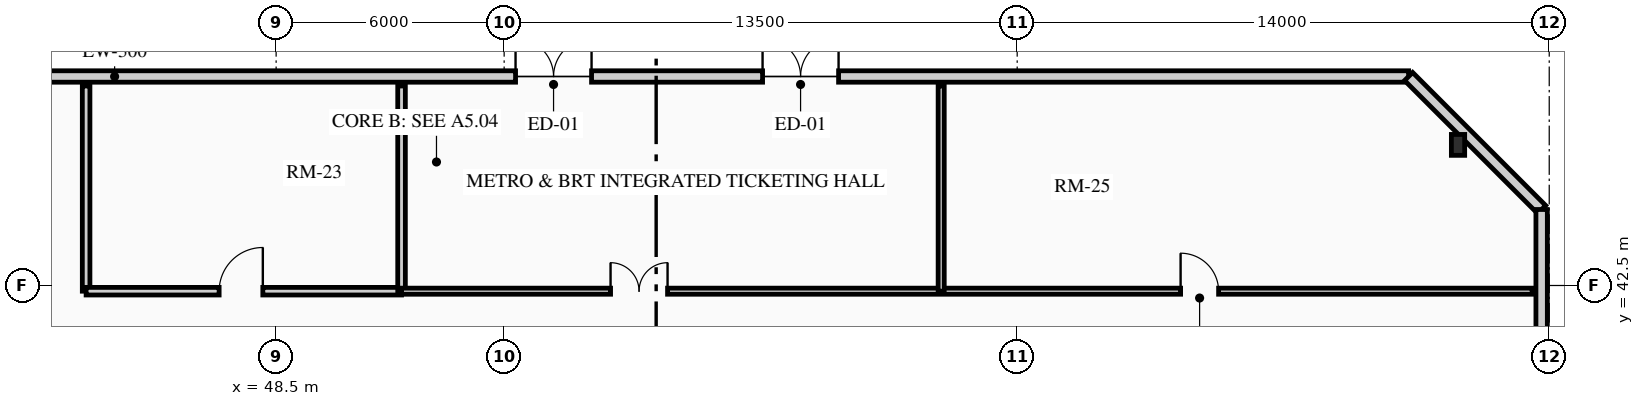
"""IFC4 building model, lengths in metres.
Left out: names, types, materials, properties, quantities, classifications, styles, units other than length and angle.
Written with IfcOpenShell. Run it as: python <this file> out.ifc"""

import sys

from ifc_helpers import new_model, si_unit, direction, frame, frame_2d, origin, origin_2d, place, context, subcontext, project, spatial, rectangle, hollow_rectangle, extrude, source, transform, mapped, element, fill, save


model = new_model("IFC4")
c1 = context("Model", 3, precision=1e-05, world=origin(), true_north=direction((0.0, 1.0)))
c2 = subcontext(c1, "Body", "Model", "MODEL_VIEW")
j1 = project(units=[si_unit("LENGTHUNIT", "METRE"), si_unit("PLANEANGLEUNIT", "RADIAN")], contexts=[c1])
p1 = place(None, origin())
s1 = spatial("IfcSite", under=j1, at=p1, CompositionType="ELEMENT")
p2 = place(p1, origin())
s2 = spatial("IfcBuilding", under=s1, at=p2, CompositionType="ELEMENT")
p3 = place(p2, origin())
s3 = spatial("IfcBuildingStorey", under=s2, at=p3, CompositionType="ELEMENT", Elevation=0.0)
p4 = place(p3, frame((79.6, 46.2, 0.0), z_axis=(0.0, 0.0, 1.0), x_axis=(1.0, 0.0, 0.0)))
e1 = element("IfcColumn", 1, at=p4, inside=s3, PredefinedType="PILASTER", context=c2, shape_type="SweptSolid", body=[
    extrude(hollow_rectangle(XDim=0.35, YDim=0.55, WallThickness=0.022, at=origin_2d()), origin(), (0.0, 0.0, 1.0), 4.8),
])
p5 = place(p3, frame((3.8, 48.0, 0.0), z_axis=(0.0, 0.0, 1.0), x_axis=(1.0, 0.0, 0.0)))
e2 = element("IfcWall", 2, at=p5, inside=s3, PredefinedType="SOLIDWALL", context=c2, shape_type="SweptSolid", body=[
    extrude(rectangle(XDim=74.5, YDim=0.3, at=frame_2d((37.25, 0.0))), origin(), (0.0, 0.0, 1.0), 4.485),
])
m1 = source(origin(), c2, "Body", "SweptSolid", [
    extrude(rectangle(XDim=1.4, YDim=2.15, at=frame_2d((0.7, 1.075))), frame((0.0, 0.16, 0.0), z_axis=(0.0, -1.0, 0.0), x_axis=(1.0, 0.0, 0.0)), (0.0, 0.0, 1.0), 0.32),
])
p6 = place(p5, frame((8.2, 0.0, 0.0)))
e3 = element("IfcOpeningElement", 3, at=p6, cuts=e2, PredefinedType="OPENING", context=c2, shape_type="MappedRepresentation", body=[
    mapped(m1, transform((0.0, 0.0, 0.0), x_axis=(1.0, 0.0, 0.0), y_axis=(0.0, 1.0, 0.0), z_axis=(0.0, 0.0, 1.0), scale=1.0)),
])
m2 = source(origin(), c2, "Body", "SweptSolid", [
    extrude(rectangle(XDim=2.0, YDim=2.25, at=frame_2d((1.0, 1.125))), frame((0.0, 0.16, 0.0), z_axis=(0.0, -1.0, 0.0), x_axis=(1.0, 0.0, 0.0)), (0.0, 0.0, 1.0), 0.32),
])
p7 = place(p5, frame((13.0, 0.0, 0.0)))
e4 = element("IfcOpeningElement", 4, at=p7, cuts=e2, PredefinedType="OPENING", context=c2, shape_type="MappedRepresentation", body=[
    mapped(m2, transform((0.0, 0.0, 0.0), x_axis=(1.0, 0.0, 0.0), y_axis=(0.0, 1.0, 0.0), z_axis=(0.0, 0.0, 1.0), scale=1.0)),
])
p8 = place(p5, frame((23.6, 0.0, 0.0)))
e5 = element("IfcOpeningElement", 5, at=p8, cuts=e2, PredefinedType="OPENING", context=c2, shape_type="MappedRepresentation", body=[
    mapped(m1, transform((0.0, 0.0, 0.0), x_axis=(1.0, 0.0, 0.0), y_axis=(0.0, 1.0, 0.0), z_axis=(0.0, 0.0, 1.0), scale=1.0)),
])
p9 = place(p5, frame((27.9, 0.0, 0.0)))
e6 = element("IfcOpeningElement", 6, at=p9, cuts=e2, PredefinedType="OPENING", context=c2, shape_type="MappedRepresentation", body=[
    mapped(m2, transform((0.0, 0.0, 0.0), x_axis=(1.0, 0.0, 0.0), y_axis=(0.0, 1.0, 0.0), z_axis=(0.0, 0.0, 1.0), scale=1.0)),
])
p10 = place(p5, frame((51.0, 0.0, 0.0)))
e7 = element("IfcOpeningElement", 7, at=p10, cuts=e2, PredefinedType="OPENING", context=c2, shape_type="MappedRepresentation", body=[
    mapped(m2, transform((0.0, 0.0, 0.0), x_axis=(1.0, 0.0, 0.0), y_axis=(0.0, 1.0, 0.0), z_axis=(0.0, 0.0, 1.0), scale=1.0)),
])
p11 = place(p5, frame((57.5, 0.0, 0.0)))
e8 = element("IfcOpeningElement", 8, at=p11, cuts=e2, PredefinedType="OPENING", context=c2, shape_type="MappedRepresentation", body=[
    mapped(m2, transform((0.0, 0.0, 0.0), x_axis=(1.0, 0.0, 0.0), y_axis=(0.0, 1.0, 0.0), z_axis=(0.0, 0.0, 1.0), scale=1.0)),
])
p12 = place(p3, frame((78.3, 48.0, 0.0), z_axis=(0.0, 0.0, 1.0), x_axis=(0.707106781187, -0.707106781187, 0.0)))
e9 = element("IfcWall", 9, at=p12, inside=s3, PredefinedType="SOLIDWALL", context=c2, shape_type="SweptSolid", body=[
    extrude(rectangle(XDim=4.95, YDim=0.3, at=frame_2d((2.475, 0.0))), origin(), (0.0, 0.0, 1.0), 4.485),
])
p13 = place(p3, frame((81.8, 44.5, 0.0), z_axis=(0.0, 0.0, 1.0), x_axis=(0.0, -1.0, 0.0)))
e10 = element("IfcWall", 10, at=p13, inside=s3, PredefinedType="SOLIDWALL", context=c2, shape_type="SweptSolid", body=[
    extrude(rectangle(XDim=40.0, YDim=0.3, at=frame_2d((20.0, 0.0))), origin(), (0.0, 0.0, 1.0), 4.485),
])
m3 = source(origin(), c2, "Body", "SweptSolid", [
    extrude(rectangle(XDim=6.0, YDim=3.1, at=frame_2d((3.0, 1.55))), frame((0.0, 0.16, 0.0), z_axis=(0.0, -1.0, 0.0), x_axis=(1.0, 0.0, 0.0)), (0.0, 0.0, 1.0), 0.32),
])
p14 = place(p13, frame((33.6, 0.0, 0.0)))
e11 = element("IfcOpeningElement", 11, at=p14, cuts=e10, PredefinedType="OPENING", context=c2, shape_type="MappedRepresentation", body=[
    mapped(m3, transform((0.0, 0.0, 0.0), x_axis=(1.0, 0.0, 0.0), y_axis=(0.0, 1.0, 0.0), z_axis=(0.0, 0.0, 1.0), scale=1.0)),
])
m4 = source(origin(), c2, "Body", "SweptSolid", [
    extrude(rectangle(XDim=3.4, YDim=3.0, at=frame_2d((1.7, 1.5))), frame((0.0, 0.16, 0.0), z_axis=(0.0, -1.0, 0.0), x_axis=(1.0, 0.0, 0.0)), (0.0, 0.0, 1.0), 0.32),
])
p15 = place(p13, frame((25.2, 0.0, 0.0)))
e12 = element("IfcOpeningElement", 12, at=p15, cuts=e10, PredefinedType="OPENING", context=c2, shape_type="MappedRepresentation", body=[
    mapped(m4, transform((0.0, 0.0, 0.0), x_axis=(1.0, 0.0, 0.0), y_axis=(0.0, 1.0, 0.0), z_axis=(0.0, 0.0, 1.0), scale=1.0)),
])
p16 = place(p13, frame((29.2, 0.0, 0.0)))
e13 = element("IfcOpeningElement", 13, at=p16, cuts=e10, PredefinedType="OPENING", context=c2, shape_type="MappedRepresentation", body=[
    mapped(m4, transform((0.0, 0.0, 0.0), x_axis=(1.0, 0.0, 0.0), y_axis=(0.0, 1.0, 0.0), z_axis=(0.0, 0.0, 1.0), scale=1.0)),
])
p17 = place(p13, frame((6.0, 0.0, 0.0)))
e14 = element("IfcOpeningElement", 14, at=p17, cuts=e10, PredefinedType="OPENING", context=c2, shape_type="MappedRepresentation", body=[
    mapped(m2, transform((0.0, 0.0, 0.0), x_axis=(1.0, 0.0, 0.0), y_axis=(0.0, 1.0, 0.0), z_axis=(0.0, 0.0, 1.0), scale=1.0)),
])
p18 = place(p13, frame((15.3, 0.0, 0.0)))
e15 = element("IfcOpeningElement", 15, at=p18, cuts=e10, PredefinedType="OPENING", context=c2, shape_type="MappedRepresentation", body=[
    mapped(m2, transform((0.0, 0.0, 0.0), x_axis=(1.0, 0.0, 0.0), y_axis=(0.0, 1.0, 0.0), z_axis=(0.0, 0.0, 1.0), scale=1.0)),
])
p19 = place(p13, frame((22.0, 0.0, 0.0)))
e16 = element("IfcOpeningElement", 16, at=p19, cuts=e10, PredefinedType="OPENING", context=c2, shape_type="MappedRepresentation", body=[
    mapped(m2, transform((0.0, 0.0, 0.0), x_axis=(1.0, 0.0, 0.0), y_axis=(0.0, 1.0, 0.0), z_axis=(0.0, 0.0, 1.0), scale=1.0)),
])
p20 = place(p3, frame((43.5, 42.35, 0.0), z_axis=(0.0, 0.0, 1.0), x_axis=(0.0, 1.0, 0.0)))
e17 = element("IfcWall", 17, at=p20, inside=s3, PredefinedType="PARTITIONING", context=c2, shape_type="SweptSolid", body=[
    extrude(rectangle(XDim=5.4, YDim=0.2, at=frame_2d((2.7, 0.0))), origin(), (0.0, 0.0, 1.0), 3.529),
])
p21 = place(p3, frame((43.5, 42.35, 0.0), z_axis=(0.0, 0.0, 1.0), x_axis=(1.0, 0.0, 0.0)))
e18 = element("IfcWall", 18, at=p21, inside=s3, PredefinedType="PARTITIONING", context=c2, shape_type="SweptSolid", body=[
    extrude(rectangle(XDim=8.3, YDim=0.2, at=frame_2d((4.15, 0.0))), origin(), (0.0, 0.0, 1.0), 4.485),
])
m5 = source(origin(), c2, "Body", "SweptSolid", [
    extrude(rectangle(XDim=1.15, YDim=2.02, at=frame_2d((0.575, 1.01))), frame((0.0, 0.11, 0.0), z_axis=(0.0, -1.0, 0.0), x_axis=(1.0, 0.0, 0.0)), (0.0, 0.0, 1.0), 0.22),
])
p22 = place(p21, frame((3.5, 0.0, 0.0)))
e19 = element("IfcOpeningElement", 19, at=p22, cuts=e18, PredefinedType="OPENING", context=c2, shape_type="MappedRepresentation", body=[
    mapped(m5, transform((0.0, 0.0, 0.0), x_axis=(1.0, 0.0, 0.0), y_axis=(0.0, 1.0, 0.0), z_axis=(0.0, 0.0, 1.0), scale=1.0)),
])
p23 = place(p3, frame((51.8, 42.35, 0.0), z_axis=(0.0, 0.0, 1.0), x_axis=(0.0, 1.0, 0.0)))
e20 = element("IfcWall", 20, at=p23, inside=s3, PredefinedType="PARTITIONING", context=c2, shape_type="SweptSolid", body=[
    extrude(rectangle(XDim=5.4, YDim=0.2, at=frame_2d((2.7, 0.0))), origin(), (0.0, 0.0, 1.0), 3.529),
])
p24 = place(p3, frame((51.8, 42.35, 0.0), z_axis=(0.0, 0.0, 1.0), x_axis=(1.0, 0.0, 0.0)))
e21 = element("IfcWall", 21, at=p24, inside=s3, PredefinedType="PARTITIONING", context=c2, shape_type="SweptSolid", body=[
    extrude(rectangle(XDim=29.75, YDim=0.16, at=frame_2d((14.875, 0.0))), origin(), (0.0, 0.0, 1.0), 3.529),
])
m6 = source(origin(), c2, "Body", "SweptSolid", [
    extrude(rectangle(XDim=1.5, YDim=2.02, at=frame_2d((0.75, 1.01))), frame((0.0, 0.09, 0.0), z_axis=(0.0, -1.0, 0.0), x_axis=(1.0, 0.0, 0.0)), (0.0, 0.0, 1.0), 0.18),
])
p25 = place(p24, frame((5.5, 0.0, 0.0)))
e22 = element("IfcOpeningElement", 22, at=p25, cuts=e21, PredefinedType="OPENING", context=c2, shape_type="MappedRepresentation", body=[
    mapped(m6, transform((0.0, 0.0, 0.0), x_axis=(1.0, 0.0, 0.0), y_axis=(0.0, 1.0, 0.0), z_axis=(0.0, 0.0, 1.0), scale=1.0)),
])
m7 = source(origin(), c2, "Body", "SweptSolid", [
    extrude(rectangle(XDim=1.0, YDim=2.015, at=frame_2d((0.5, 1.007))), frame((0.0, 0.09, 0.0), z_axis=(0.0, -1.0, 0.0), x_axis=(1.0, 0.0, 0.0)), (0.0, 0.0, 1.0), 0.18),
])
p26 = place(p24, frame((20.5, 0.0, 0.0)))
e23 = element("IfcOpeningElement", 23, at=p26, cuts=e21, PredefinedType="OPENING", context=c2, shape_type="MappedRepresentation", body=[
    mapped(m7, transform((0.0, 0.0, 0.0), x_axis=(1.0, 0.0, 0.0), y_axis=(0.0, 1.0, 0.0), z_axis=(0.0, 0.0, 1.0), scale=1.0)),
])
p27 = place(p3, frame((66.0, 42.35, 0.0), z_axis=(0.0, 0.0, 1.0), x_axis=(0.0, 1.0, 0.0)))
e24 = element("IfcWall", 24, at=p27, inside=s3, PredefinedType="PARTITIONING", context=c2, shape_type="SweptSolid", body=[
    extrude(rectangle(XDim=5.4, YDim=0.16, at=frame_2d((2.7, 0.0))), origin(), (0.0, 0.0, 1.0), 3.529),
])
m8 = source(origin(), c2, "Body", "SweptSolid", [
    extrude(rectangle(XDim=2.0, YDim=2.25, at=frame_2d((1.0, 1.125))), frame((0.0, 0.025, 0.0), z_axis=(0.0, -1.0, 0.0), x_axis=(1.0, 0.0, 0.0)), (0.0, 0.0, 1.0), 0.05),
])
p28 = place(p10, origin())
e25 = element("IfcDoor", 25, at=p28, inside=s3, OperationType="DOUBLE_DOOR_SINGLE_SWING", PredefinedType="DOOR", context=c2, shape_type="MappedRepresentation", body=[
    mapped(m8, transform((0.0, 0.0, 0.0), x_axis=(1.0, 0.0, 0.0), y_axis=(0.0, 1.0, 0.0), z_axis=(0.0, 0.0, 1.0), scale=1.0)),
])
fill(e7, e25)
p29 = place(p11, origin())
e26 = element("IfcDoor", 26, at=p29, inside=s3, OperationType="DOUBLE_DOOR_SINGLE_SWING", PredefinedType="DOOR", context=c2, shape_type="MappedRepresentation", body=[
    mapped(m8, transform((0.0, 0.0, 0.0), x_axis=(1.0, 0.0, 0.0), y_axis=(0.0, 1.0, 0.0), z_axis=(0.0, 0.0, 1.0), scale=1.0)),
])
fill(e8, e26)
m9 = source(origin(), c2, "Body", "SweptSolid", [
    extrude(rectangle(XDim=1.15, YDim=2.02, at=frame_2d((0.575, 1.01))), frame((0.0, 0.025, 0.0), z_axis=(0.0, -1.0, 0.0), x_axis=(1.0, 0.0, 0.0)), (0.0, 0.0, 1.0), 0.05),
])
p30 = place(p22, origin())
e27 = element("IfcDoor", 27, at=p30, inside=s3, OperationType="SINGLE_SWING_RIGHT", PredefinedType="DOOR", context=c2, shape_type="MappedRepresentation", body=[
    mapped(m9, transform((0.0, 0.0, 0.0), x_axis=(1.0, 0.0, 0.0), y_axis=(0.0, 1.0, 0.0), z_axis=(0.0, 0.0, 1.0), scale=1.0)),
])
fill(e19, e27)
m10 = source(origin(), c2, "Body", "SweptSolid", [
    extrude(rectangle(XDim=1.5, YDim=2.02, at=frame_2d((0.75, 1.01))), frame((0.0, 0.025, 0.0), z_axis=(0.0, -1.0, 0.0), x_axis=(1.0, 0.0, 0.0)), (0.0, 0.0, 1.0), 0.05),
])
p31 = place(p25, origin())
e28 = element("IfcDoor", 28, at=p31, inside=s3, OperationType="DOUBLE_DOOR_SINGLE_SWING", PredefinedType="DOOR", context=c2, shape_type="MappedRepresentation", body=[
    mapped(m10, transform((0.0, 0.0, 0.0), x_axis=(1.0, 0.0, 0.0), y_axis=(0.0, 1.0, 0.0), z_axis=(0.0, 0.0, 1.0), scale=1.0)),
])
fill(e22, e28)
m11 = source(origin(), c2, "Body", "SweptSolid", [
    extrude(rectangle(XDim=1.0, YDim=2.015, at=frame_2d((0.5, 1.007))), frame((0.0, 0.025, 0.0), z_axis=(0.0, -1.0, 0.0), x_axis=(1.0, 0.0, 0.0)), (0.0, 0.0, 1.0), 0.05),
])
p32 = place(p26, origin())
e29 = element("IfcDoor", 29, at=p32, inside=s3, OperationType="SINGLE_SWING_LEFT", PredefinedType="DOOR", context=c2, shape_type="MappedRepresentation", body=[
    mapped(m11, transform((0.0, 0.0, 0.0), x_axis=(1.0, 0.0, 0.0), y_axis=(0.0, 1.0, 0.0), z_axis=(0.0, 0.0, 1.0), scale=1.0)),
])
fill(e23, e29)
save(model, sys.argv[1])
